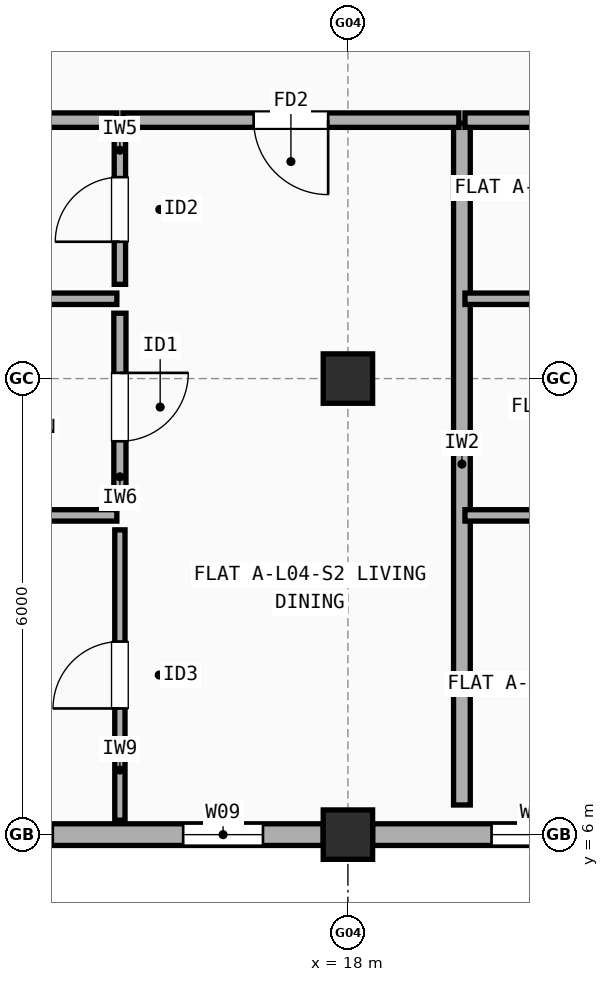
"""IFC4 building model, lengths in metres.
Left out: names, types, materials, properties, quantities, classifications, styles, units other than length and angle.
Written with IfcOpenShell. Run it as: python <this file> out.ifc"""

import sys

from ifc_helpers import new_model, si_unit, direction, frame, frame_2d, origin, origin_2d, place, context, subcontext, project, spatial, rectangle, extrude, element, fill, save


model = new_model("IFC4")
c1 = context("Model", 3, precision=1e-05, world=origin(), true_north=direction((0.0, 1.0)))
c2 = subcontext(c1, "Body", "Model", "MODEL_VIEW")
j1 = project(units=[si_unit("LENGTHUNIT", "METRE"), si_unit("PLANEANGLEUNIT", "RADIAN")], contexts=[c1])
p1 = place(None, origin())
s1 = spatial("IfcSite", under=j1, at=p1, CompositionType="ELEMENT")
p2 = place(p1, origin())
s2 = spatial("IfcBuilding", under=s1, at=p2, CompositionType="ELEMENT")
p3 = place(p2, frame((0.0, 0.0, 14.1)))
s3 = spatial("IfcBuildingStorey", under=s2, at=p3, CompositionType="ELEMENT", Elevation=14.1)
for number, where, z_axis, x_axis in (
    (1, (18.0, 6.0, 0.0), (0.0, 0.0, 1.0), (1.0, 0.0, 0.0)),
    (2, (18.0, 12.0, 0.0), (0.0, 0.0, 1.0), (1.0, 0.0, 0.0)),
):
    element("IfcColumn", number, at=place(p3, frame(where, z_axis=z_axis, x_axis=x_axis)), inside=s3, PredefinedType="COLUMN", context=c2, shape_type="SweptSolid", body=[
        extrude(rectangle(XDim=0.65, YDim=0.65, at=origin_2d()), origin(), (0.0, 0.0, 1.0), 2.95),
    ])
p4 = place(p3, frame((12.325, 6.0, 0.0), z_axis=(0.0, 0.0, 1.0), x_axis=(1.0, 0.0, 0.0)))
e3 = element("IfcWall", 3, at=p4, inside=s3, PredefinedType="STANDARD", context=c2, shape_type="SweptSolid", body=[
    extrude(rectangle(XDim=5.35, YDim=0.285, at=frame_2d((2.675, 0.0))), origin(), (0.0, 0.0, 1.0), 2.432),
])
p5 = place(p4, frame((0.843, 0.0, 0.9)))
e4 = element("IfcOpeningElement", 4, at=p5, cuts=e3, PredefinedType="OPENING", context=c2, shape_type="SweptSolid", body=[
    extrude(rectangle(XDim=0.95, YDim=1.35, at=frame_2d((0.475, 0.675))), frame((0.0, 0.152, 0.0), z_axis=(0.0, -1.0, 0.0), x_axis=(1.0, 0.0, 0.0)), (0.0, 0.0, 1.0), 0.305),
])
p6 = place(p4, frame((3.508, 0.0, 0.9)))
e5 = element("IfcOpeningElement", 5, at=p6, cuts=e3, PredefinedType="OPENING", context=c2, shape_type="SweptSolid", body=[
    extrude(rectangle(XDim=1.05, YDim=1.35, at=frame_2d((0.525, 0.675))), frame((0.0, 0.152, 0.0), z_axis=(0.0, -1.0, 0.0), x_axis=(1.0, 0.0, 0.0)), (0.0, 0.0, 1.0), 0.305),
])
p7 = place(p3, frame((18.325, 6.0, 0.0), z_axis=(0.0, 0.0, 1.0), x_axis=(1.0, 0.0, 0.0)))
e6 = element("IfcWall", 6, at=p7, inside=s3, PredefinedType="STANDARD", context=c2, shape_type="SweptSolid", body=[
    extrude(rectangle(XDim=5.35, YDim=0.285, at=frame_2d((2.675, 0.0))), origin(), (0.0, 0.0, 1.0), 2.432),
])
p8 = place(p7, frame((1.565, 0.0, 0.9)))
e7 = element("IfcOpeningElement", 7, at=p8, cuts=e6, PredefinedType="OPENING", context=c2, shape_type="SweptSolid", body=[
    extrude(rectangle(XDim=1.2, YDim=1.35, at=frame_2d((0.6, 0.675))), frame((0.0, 0.152, 0.0), z_axis=(0.0, -1.0, 0.0), x_axis=(1.0, 0.0, 0.0)), (0.0, 0.0, 1.0), 0.305),
])
p9 = place(p7, frame((3.8, 0.0, 0.9)))
e8 = element("IfcOpeningElement", 8, at=p9, cuts=e6, PredefinedType="OPENING", context=c2, shape_type="SweptSolid", body=[
    extrude(rectangle(XDim=1.2, YDim=1.35, at=frame_2d((0.6, 0.675))), frame((0.0, 0.152, 0.0), z_axis=(0.0, -1.0, 0.0), x_axis=(1.0, 0.0, 0.0)), (0.0, 0.0, 1.0), 0.305),
])
p10 = place(p3, frame((19.5, 6.39, 0.0), z_axis=(0.0, 0.0, 1.0), x_axis=(0.0, 1.0, 0.0)))
e9 = element("IfcWall", 9, at=p10, inside=s3, PredefinedType="SOLIDWALL", context=c2, shape_type="SweptSolid", body=[
    extrude(rectangle(XDim=8.97, YDim=0.22, at=frame_2d((4.485, 0.0))), origin(), (0.0, 0.0, 1.0), 2.408),
])
p11 = place(p3, frame((10.54, 15.4, 0.0), z_axis=(0.0, 0.0, 1.0), x_axis=(1.0, 0.0, 0.0)))
e10 = element("IfcWall", 10, at=p11, inside=s3, PredefinedType="SOLIDWALL", context=c2, shape_type="SweptSolid", body=[
    extrude(rectangle(XDim=4.42, YDim=0.19, at=frame_2d((2.21, 0.0))), origin(), (0.0, 0.0, 1.0), 2.458),
])
p12 = place(p3, frame((15.04, 15.4, 0.0), z_axis=(0.0, 0.0, 1.0), x_axis=(1.0, 0.0, 0.0)))
e11 = element("IfcWall", 11, at=p12, inside=s3, PredefinedType="SOLIDWALL", context=c2, shape_type="SweptSolid", body=[
    extrude(rectangle(XDim=4.42, YDim=0.19, at=frame_2d((2.21, 0.0))), origin(), (0.0, 0.0, 1.0), 2.508),
])
p13 = place(p12, frame((1.72, 0.0, 0.0)))
e12 = element("IfcOpeningElement", 12, at=p13, cuts=e11, PredefinedType="OPENING", context=c2, shape_type="SweptSolid", body=[
    extrude(rectangle(XDim=0.98, YDim=2.15, at=frame_2d((0.49, 1.075))), frame((0.0, 0.105, 0.0), z_axis=(0.0, -1.0, 0.0), x_axis=(1.0, 0.0, 0.0)), (0.0, 0.0, 1.0), 0.21),
])
p14 = place(p3, frame((15.0, 6.19, 0.0), z_axis=(0.0, 0.0, 1.0), x_axis=(0.0, 1.0, 0.0)))
e13 = element("IfcWall", 13, at=p14, inside=s3, PredefinedType="PARTITIONING", context=c2, shape_type="SweptSolid", body=[
    extrude(rectangle(XDim=3.82, YDim=0.135, at=frame_2d((1.91, 0.0))), origin(), (0.0, 0.0, 1.0), 2.95),
])
p15 = place(p14, frame((1.47, 0.0, 0.0)))
e14 = element("IfcOpeningElement", 14, at=p15, cuts=e13, PredefinedType="OPENING", context=c2, shape_type="SweptSolid", body=[
    extrude(rectangle(XDim=0.88, YDim=2.1, at=frame_2d((0.44, 1.05))), frame((0.0, 0.077, 0.0), z_axis=(0.0, -1.0, 0.0), x_axis=(1.0, 0.0, 0.0)), (0.0, 0.0, 1.0), 0.155),
])
p16 = place(p3, frame((15.0, 10.39, 0.0), z_axis=(0.0, 0.0, 1.0), x_axis=(0.0, 1.0, 0.0)))
e15 = element("IfcWall", 15, at=p16, inside=s3, PredefinedType="PLUMBINGWALL", context=c2, shape_type="SweptSolid", body=[
    extrude(rectangle(XDim=2.47, YDim=0.16, at=frame_2d((1.235, 0.0))), origin(), (0.0, 0.0, 1.0), 2.508),
])
p17 = place(p16, frame((0.785, 0.0, 0.0)))
e16 = element("IfcOpeningElement", 16, at=p17, cuts=e15, PredefinedType="OPENING", context=c2, shape_type="SweptSolid", body=[
    extrude(rectangle(XDim=0.9, YDim=2.1, at=frame_2d((0.45, 1.05))), frame((0.0, 0.09, 0.0), z_axis=(0.0, -1.0, 0.0), x_axis=(1.0, 0.0, 0.0)), (0.0, 0.0, 1.0), 0.18),
])
p18 = place(p3, frame((15.0, 13.24, 0.0), z_axis=(0.0, 0.0, 1.0), x_axis=(0.0, 1.0, 0.0)))
e17 = element("IfcWall", 17, at=p18, inside=s3, PredefinedType="PARTITIONING", context=c2, shape_type="SweptSolid", body=[
    extrude(rectangle(XDim=1.97, YDim=0.15, at=frame_2d((0.985, 0.0))), origin(), (0.0, 0.0, 1.0), 2.95),
])
p19 = place(p18, frame((0.56, 0.0, 0.0)))
e18 = element("IfcOpeningElement", 18, at=p19, cuts=e17, PredefinedType="OPENING", context=c2, shape_type="SweptSolid", body=[
    extrude(rectangle(XDim=0.85, YDim=2.1, at=frame_2d((0.425, 1.05))), frame((0.0, 0.085, 0.0), z_axis=(0.0, -1.0, 0.0), x_axis=(1.0, 0.0, 0.0)), (0.0, 0.0, 1.0), 0.17),
])
p20 = place(p3, frame((10.54, 10.2, 0.0), z_axis=(0.0, 0.0, 1.0), x_axis=(1.0, 0.0, 0.0)))
e19 = element("IfcWall", 19, at=p20, inside=s3, PredefinedType="PARTITIONING", context=c2, shape_type="SweptSolid", body=[
    extrude(rectangle(XDim=4.42, YDim=0.15, at=frame_2d((2.21, 0.0))), origin(), (0.0, 0.0, 1.0), 2.508),
])
p21 = place(p3, frame((10.54, 13.05, 0.0), z_axis=(0.0, 0.0, 1.0), x_axis=(1.0, 0.0, 0.0)))
e20 = element("IfcWall", 20, at=p21, inside=s3, PredefinedType="PARTITIONING", context=c2, shape_type="SweptSolid", body=[
    extrude(rectangle(XDim=4.42, YDim=0.15, at=frame_2d((2.21, 0.0))), origin(), (0.0, 0.0, 1.0), 2.458),
])
p22 = place(p3, frame((19.54, 15.4, 0.0), z_axis=(0.0, 0.0, 1.0), x_axis=(1.0, 0.0, 0.0)))
e21 = element("IfcWall", 21, at=p22, inside=s3, PredefinedType="SOLIDWALL", context=c2, shape_type="SweptSolid", body=[
    extrude(rectangle(XDim=4.42, YDim=0.19, at=frame_2d((2.21, 0.0))), origin(), (0.0, 0.0, 1.0), 2.458),
])
p23 = place(p3, frame((19.54, 10.2, 0.0), z_axis=(0.0, 0.0, 1.0), x_axis=(1.0, 0.0, 0.0)))
e22 = element("IfcWall", 22, at=p23, inside=s3, PredefinedType="PARTITIONING", context=c2, shape_type="SweptSolid", body=[
    extrude(rectangle(XDim=4.42, YDim=0.15, at=frame_2d((2.21, 0.0))), origin(), (0.0, 0.0, 1.0), 2.508),
])
p24 = place(p3, frame((19.54, 13.05, 0.0), z_axis=(0.0, 0.0, 1.0), x_axis=(1.0, 0.0, 0.0)))
e23 = element("IfcWall", 23, at=p24, inside=s3, PredefinedType="PARTITIONING", context=c2, shape_type="SweptSolid", body=[
    extrude(rectangle(XDim=4.42, YDim=0.15, at=frame_2d((2.21, 0.0))), origin(), (0.0, 0.0, 1.0), 2.458),
])
p25 = place(p5, origin())
e24 = element("IfcWindow", 24, at=p25, inside=s3, PartitioningType="SINGLE_PANEL", PredefinedType="WINDOW", context=c2, shape_type="SweptSolid", body=[
    extrude(rectangle(XDim=0.95, YDim=1.35, at=frame_2d((0.475, 0.675))), frame((0.0, 0.03, 0.0), z_axis=(0.0, -1.0, 0.0), x_axis=(1.0, 0.0, 0.0)), (0.0, 0.0, 1.0), 0.06),
])
fill(e4, e24)
p26 = place(p6, origin())
e25 = element("IfcWindow", 25, at=p26, inside=s3, PartitioningType="SINGLE_PANEL", PredefinedType="WINDOW", context=c2, shape_type="SweptSolid", body=[
    extrude(rectangle(XDim=1.05, YDim=1.35, at=frame_2d((0.525, 0.675))), frame((0.0, 0.03, 0.0), z_axis=(0.0, -1.0, 0.0), x_axis=(1.0, 0.0, 0.0)), (0.0, 0.0, 1.0), 0.06),
])
fill(e5, e25)
p27 = place(p8, origin())
e26 = element("IfcWindow", 26, at=p27, inside=s3, PartitioningType="SINGLE_PANEL", PredefinedType="WINDOW", context=c2, shape_type="SweptSolid", body=[
    extrude(rectangle(XDim=1.2, YDim=1.35, at=frame_2d((0.6, 0.675))), frame((0.0, 0.03, 0.0), z_axis=(0.0, -1.0, 0.0), x_axis=(1.0, 0.0, 0.0)), (0.0, 0.0, 1.0), 0.06),
])
fill(e7, e26)
p28 = place(p13, origin())
e27 = element("IfcDoor", 27, at=p28, inside=s3, OperationType="SINGLE_SWING_RIGHT", PredefinedType="DOOR", context=c2, shape_type="SweptSolid", body=[
    extrude(rectangle(XDim=0.98, YDim=2.15, at=frame_2d((0.49, 1.075))), frame((0.0, 0.025, 0.0), z_axis=(0.0, -1.0, 0.0), x_axis=(1.0, 0.0, 0.0)), (0.0, 0.0, 1.0), 0.05),
])
fill(e12, e27)
p29 = place(p15, origin())
e28 = element("IfcDoor", 28, at=p29, inside=s3, OperationType="SINGLE_SWING_LEFT", PredefinedType="DOOR", context=c2, shape_type="SweptSolid", body=[
    extrude(rectangle(XDim=0.88, YDim=2.1, at=frame_2d((0.44, 1.05))), frame((0.0, 0.025, 0.0), z_axis=(0.0, -1.0, 0.0), x_axis=(1.0, 0.0, 0.0)), (0.0, 0.0, 1.0), 0.05),
])
fill(e14, e28)
p30 = place(p17, origin())
e29 = element("IfcDoor", 29, at=p30, inside=s3, OperationType="SINGLE_SWING_RIGHT", PredefinedType="DOOR", context=c2, shape_type="SweptSolid", body=[
    extrude(rectangle(XDim=0.9, YDim=2.1, at=frame_2d((0.45, 1.05))), frame((0.0, 0.025, 0.0), z_axis=(0.0, -1.0, 0.0), x_axis=(1.0, 0.0, 0.0)), (0.0, 0.0, 1.0), 0.05),
])
fill(e16, e29)
p31 = place(p19, origin())
e30 = element("IfcDoor", 30, at=p31, inside=s3, OperationType="SINGLE_SWING_LEFT", PredefinedType="DOOR", context=c2, shape_type="SweptSolid", body=[
    extrude(rectangle(XDim=0.85, YDim=2.1, at=frame_2d((0.425, 1.05))), frame((0.0, 0.025, 0.0), z_axis=(0.0, -1.0, 0.0), x_axis=(1.0, 0.0, 0.0)), (0.0, 0.0, 1.0), 0.05),
])
fill(e18, e30)
save(model, sys.argv[1])
